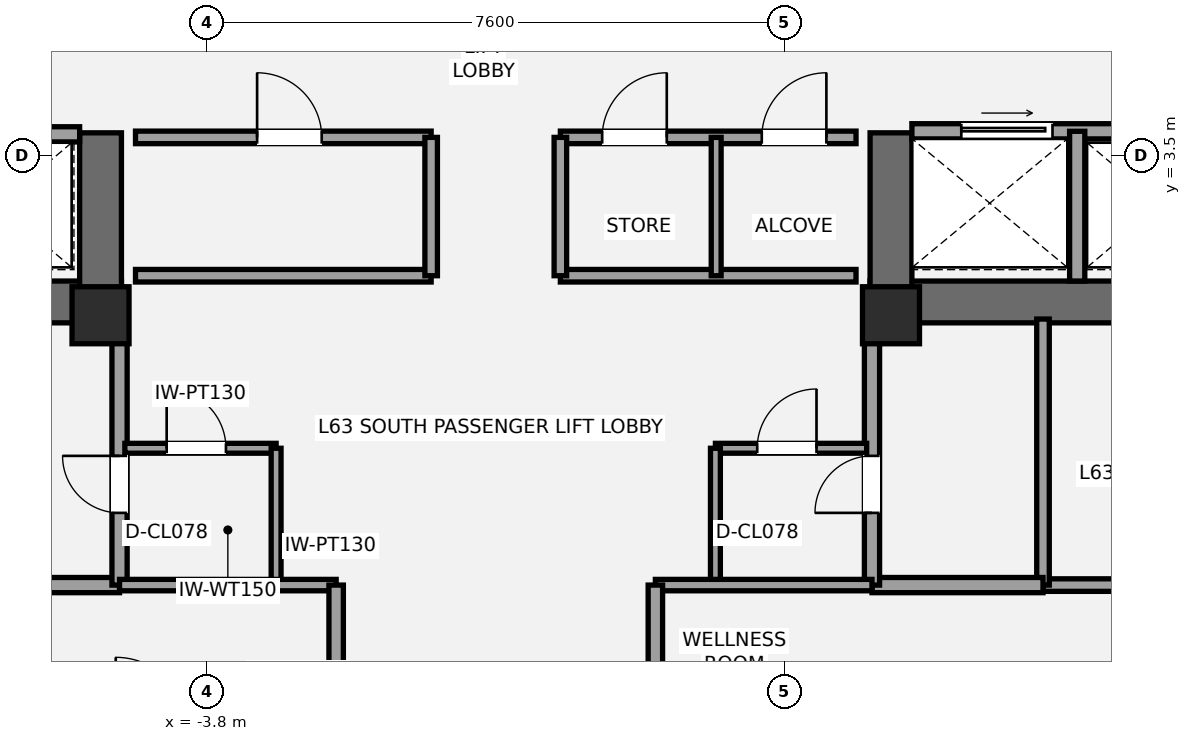
"""IFC4 building model, lengths in metres.
Left out: names, types, materials, properties, quantities, classifications, styles, units other than length and angle.
Written with IfcOpenShell. Run it as: python <this file> out.ifc"""

import sys

from ifc_helpers import new_model, si_unit, direction, frame, frame_2d, origin, origin_2d, place, context, subcontext, project, spatial, rectangle, extrude, element, fill, save


model = new_model("IFC4")
c1 = context("Model", 3, precision=1e-05, world=origin(), true_north=direction((0.0, 1.0)))
c2 = subcontext(c1, "Body", "Model", "MODEL_VIEW")
j1 = project(units=[si_unit("LENGTHUNIT", "METRE"), si_unit("PLANEANGLEUNIT", "RADIAN")], contexts=[c1])
p1 = place(None, origin())
s1 = spatial("IfcSite", under=j1, at=p1, CompositionType="ELEMENT")
p2 = place(p1, origin())
s2 = spatial("IfcBuilding", under=s1, at=p2, CompositionType="ELEMENT")
p3 = place(p2, frame((0.0, 0.0, 225.75)))
s3 = spatial("IfcBuildingStorey", under=s2, at=p3, CompositionType="ELEMENT", Elevation=225.75)
p4 = place(p3, frame((-4.925, 1.575, 0.0), z_axis=(0.0, 0.0, 1.0), x_axis=(-1.0, 0.0, 0.0)))
e1 = element("IfcWall", 1, at=p4, inside=s3, PredefinedType="SHEAR", context=c2, shape_type="SweptSolid", body=[
    extrude(rectangle(XDim=8.775, YDim=0.55, at=frame_2d((4.387, 0.0))), origin(), (0.0, 0.0, 1.0), 3.15),
])
p5 = place(p4, frame((5.375, 0.0, 0.0)))
e2 = element("IfcOpeningElement", 2, at=p5, cuts=e1, PredefinedType="OPENING", context=c2, shape_type="SweptSolid", body=[
    extrude(rectangle(XDim=1.05, YDim=2.15, at=frame_2d((0.525, 1.075))), frame((0.0, 0.285, 0.0), z_axis=(0.0, -1.0, 0.0), x_axis=(1.0, 0.0, 0.0)), (0.0, 0.0, 1.0), 0.57),
])
p6 = place(p4, frame((3.705, 0.0, 0.0)))
e3 = element("IfcOpeningElement", 3, at=p6, cuts=e1, PredefinedType="OPENING", context=c2, shape_type="SweptSolid", body=[
    extrude(rectangle(XDim=1.1, YDim=2.2, at=frame_2d((0.55, 1.1))), frame((0.0, 0.285, 0.0), z_axis=(0.0, -1.0, 0.0), x_axis=(1.0, 0.0, 0.0)), (0.0, 0.0, 1.0), 0.57),
])
p7 = place(p3, frame((-5.2, 1.3, 0.0), z_axis=(0.0, 0.0, 1.0), x_axis=(0.0, 1.0, 0.0)))
e4 = element("IfcWall", 4, at=p7, inside=s3, PredefinedType="SHEAR", context=c2, shape_type="SweptSolid", body=[
    extrude(rectangle(XDim=2.5, YDim=0.55, at=frame_2d((1.25, 0.0))), origin(), (0.0, 0.0, 1.0), 3.15),
])
p8 = place(p3, frame((13.7, 1.575, 0.0), z_axis=(0.0, 0.0, 1.0), x_axis=(-1.0, 0.0, 0.0)))
e5 = element("IfcWall", 5, at=p8, inside=s3, PredefinedType="SHEAR", context=c2, shape_type="SweptSolid", body=[
    extrude(rectangle(XDim=8.775, YDim=0.55, at=frame_2d((4.387, 0.0))), origin(), (0.0, 0.0, 1.0), 3.15),
])
p9 = place(p8, frame((2.35, 0.0, 0.0)))
e6 = element("IfcOpeningElement", 6, at=p9, cuts=e5, PredefinedType="OPENING", context=c2, shape_type="SweptSolid", body=[
    extrude(rectangle(XDim=1.05, YDim=2.15, at=frame_2d((0.525, 1.075))), frame((0.0, 0.285, 0.0), z_axis=(0.0, -1.0, 0.0), x_axis=(1.0, 0.0, 0.0)), (0.0, 0.0, 1.0), 0.57),
])
p10 = place(p8, frame((4.35, 0.0, 0.0)))
e7 = element("IfcOpeningElement", 7, at=p10, cuts=e5, PredefinedType="OPENING", context=c2, shape_type="SweptSolid", body=[
    extrude(rectangle(XDim=1.1, YDim=2.2, at=frame_2d((0.55, 1.1))), frame((0.0, 0.285, 0.0), z_axis=(0.0, -1.0, 0.0), x_axis=(1.0, 0.0, 0.0)), (0.0, 0.0, 1.0), 0.57),
])
p11 = place(p3, frame((5.2, 1.3, 0.0), z_axis=(0.0, 0.0, 1.0), x_axis=(0.0, 1.0, 0.0)))
e8 = element("IfcWall", 8, at=p11, inside=s3, PredefinedType="SHEAR", context=c2, shape_type="SweptSolid", body=[
    extrude(rectangle(XDim=2.5, YDim=0.55, at=frame_2d((1.25, 0.0))), origin(), (0.0, 0.0, 1.0), 3.15),
])
for number, where, z_axis, x_axis in (
    (9, (-5.2, 1.4, 0.0), (0.0, 0.0, 1.0), (1.0, 0.0, 0.0)),
    (10, (5.2, 1.4, 0.0), (0.0, 0.0, 1.0), (1.0, 0.0, 0.0)),
):
    element("IfcColumn", number, at=place(p3, frame(where, z_axis=z_axis, x_axis=x_axis)), inside=s3, PredefinedType="PILASTER", context=c2, shape_type="SweptSolid", body=[
        extrude(rectangle(XDim=0.75, YDim=0.75, at=origin_2d()), origin(), (0.0, 0.0, 1.0), 3.15),
    ])
p12 = place(p3, frame((-7.2, -2.15, 0.0), z_axis=(0.0, 0.0, 1.0), x_axis=(1.0, 0.0, 0.0)))
e11 = element("IfcWall", 11, at=p12, inside=s3, PredefinedType="SOLIDWALL", context=c2, shape_type="SweptSolid", body=[
    extrude(rectangle(XDim=2.25, YDim=0.2, at=frame_2d((1.125, 0.0))), origin(), (0.0, 0.0, 1.0), 2.97),
])
p13 = place(p3, frame((-4.95, -2.15, 0.0), z_axis=(0.0, 0.0, 1.0), x_axis=(0.0, 1.0, 0.0)))
e12 = element("IfcWall", 12, at=p13, inside=s3, PredefinedType="SOLIDWALL", context=c2, shape_type="SweptSolid", body=[
    extrude(rectangle(XDim=3.5, YDim=0.2, at=frame_2d((1.75, 0.0))), origin(), (0.0, 0.0, 1.0), 2.423),
])
p14 = place(p13, frame((0.95, 0.0, 0.0)))
e13 = element("IfcOpeningElement", 13, at=p14, cuts=e12, PredefinedType="OPENING", context=c2, shape_type="SweptSolid", body=[
    extrude(rectangle(XDim=0.75, YDim=2.1, at=frame_2d((0.375, 1.05))), frame((0.0, 0.11, 0.0), z_axis=(0.0, -1.0, 0.0), x_axis=(1.0, 0.0, 0.0)), (0.0, 0.0, 1.0), 0.22),
])
p15 = place(p3, frame((7.2, -2.15, 0.0), z_axis=(0.0, 0.0, 1.0), x_axis=(1.0, 0.0, 0.0)))
e14 = element("IfcWall", 14, at=p15, inside=s3, PredefinedType="PARTITIONING", context=c2, shape_type="SweptSolid", body=[
    extrude(rectangle(XDim=6.25, YDim=0.165, at=frame_2d((3.125, 0.0))), origin(), (0.0, 0.0, 1.0), 2.97),
])
p16 = place(p3, frame((7.2, -2.15, 0.0), z_axis=(0.0, 0.0, 1.0), x_axis=(0.0, 1.0, 0.0)))
e15 = element("IfcWall", 15, at=p16, inside=s3, PredefinedType="PARTITIONING", context=c2, shape_type="SweptSolid", body=[
    extrude(rectangle(XDim=3.5, YDim=0.165, at=frame_2d((1.75, 0.0))), origin(), (0.0, 0.0, 1.0), 2.423),
])
p17 = place(p3, frame((4.95, -2.15, 0.0), z_axis=(0.0, 0.0, 1.0), x_axis=(1.0, 0.0, 0.0)))
e16 = element("IfcWall", 16, at=p17, inside=s3, PredefinedType="SOLIDWALL", context=c2, shape_type="SweptSolid", body=[
    extrude(rectangle(XDim=2.25, YDim=0.2, at=frame_2d((1.125, 0.0))), origin(), (0.0, 0.0, 1.0), 2.97),
])
p18 = place(p3, frame((4.95, -2.15, 0.0), z_axis=(0.0, 0.0, 1.0), x_axis=(0.0, 1.0, 0.0)))
e17 = element("IfcWall", 17, at=p18, inside=s3, PredefinedType="SOLIDWALL", context=c2, shape_type="SweptSolid", body=[
    extrude(rectangle(XDim=3.5, YDim=0.2, at=frame_2d((1.75, 0.0))), origin(), (0.0, 0.0, 1.0), 2.423),
])
p19 = place(p18, frame((0.95, 0.0, 0.0)))
e18 = element("IfcOpeningElement", 18, at=p19, cuts=e17, PredefinedType="OPENING", context=c2, shape_type="SweptSolid", body=[
    extrude(rectangle(XDim=0.75, YDim=2.1, at=frame_2d((0.375, 1.05))), frame((0.0, 0.11, 0.0), z_axis=(0.0, -1.0, 0.0), x_axis=(1.0, 0.0, 0.0)), (0.0, 0.0, 1.0), 0.22),
])
p20 = place(p3, frame((-4.88, -0.35, 0.0), z_axis=(0.0, 0.0, 1.0), x_axis=(1.0, 0.0, 0.0)))
e19 = element("IfcWall", 19, at=p20, inside=s3, PredefinedType="PARTITIONING", context=c2, shape_type="SweptSolid", body=[
    extrude(rectangle(XDim=1.99, YDim=0.13, at=frame_2d((0.995, 0.0))), origin(), (0.0, 0.0, 1.0), 2.97),
])
p21 = place(p20, frame((0.55, 0.0, 0.0)))
e20 = element("IfcOpeningElement", 20, at=p21, cuts=e19, PredefinedType="OPENING", context=c2, shape_type="SweptSolid", body=[
    extrude(rectangle(XDim=0.78, YDim=2.1, at=frame_2d((0.39, 1.05))), frame((0.0, 0.075, 0.0), z_axis=(0.0, -1.0, 0.0), x_axis=(1.0, 0.0, 0.0)), (0.0, 0.0, 1.0), 0.15),
])
p22 = place(p3, frame((-2.89, -2.15, 0.0), z_axis=(0.0, 0.0, 1.0), x_axis=(0.0, 1.0, 0.0)))
e21 = element("IfcWall", 21, at=p22, inside=s3, PredefinedType="PARTITIONING", context=c2, shape_type="SweptSolid", body=[
    extrude(rectangle(XDim=1.8, YDim=0.13, at=frame_2d((0.9, 0.0))), origin(), (0.0, 0.0, 1.0), 2.423),
])
p23 = place(p3, frame((2.89, -0.35, 0.0), z_axis=(0.0, 0.0, 1.0), x_axis=(1.0, 0.0, 0.0)))
e22 = element("IfcWall", 22, at=p23, inside=s3, PredefinedType="PARTITIONING", context=c2, shape_type="SweptSolid", body=[
    extrude(rectangle(XDim=1.99, YDim=0.13, at=frame_2d((0.995, 0.0))), origin(), (0.0, 0.0, 1.0), 2.423),
])
p24 = place(p23, frame((0.55, 0.0, 0.0)))
e23 = element("IfcOpeningElement", 23, at=p24, cuts=e22, PredefinedType="OPENING", context=c2, shape_type="SweptSolid", body=[
    extrude(rectangle(XDim=0.78, YDim=2.1, at=frame_2d((0.39, 1.05))), frame((0.0, 0.075, 0.0), z_axis=(0.0, -1.0, 0.0), x_axis=(1.0, 0.0, 0.0)), (0.0, 0.0, 1.0), 0.15),
])
p25 = place(p3, frame((2.89, -2.15, 0.0), z_axis=(0.0, 0.0, 1.0), x_axis=(0.0, 1.0, 0.0)))
e24 = element("IfcWall", 24, at=p25, inside=s3, PredefinedType="PARTITIONING", context=c2, shape_type="SweptSolid", body=[
    extrude(rectangle(XDim=1.8, YDim=0.13, at=frame_2d((0.9, 0.0))), origin(), (0.0, 0.0, 1.0), 2.97),
])
p26 = place(p3, frame((-9.78, 3.78, 0.0), z_axis=(0.0, 0.0, 1.0), x_axis=(1.0, 0.0, 0.0)))
e25 = element("IfcWall", 25, at=p26, inside=s3, PredefinedType="SOLIDWALL", context=c2, shape_type="SweptSolid", body=[
    extrude(rectangle(XDim=4.305, YDim=0.2, at=frame_2d((2.152, 0.0))), origin(), (0.0, 0.0, 1.0), 2.97),
])
p27 = place(p26, frame((2.72, 0.0, 0.0)))
e26 = element("IfcOpeningElement", 26, at=p27, cuts=e25, PredefinedType="OPENING", context=c2, shape_type="SweptSolid", body=[
    extrude(rectangle(XDim=1.1, YDim=2.2, at=frame_2d((0.55, 1.1))), frame((0.0, 0.11, 0.0), z_axis=(0.0, -1.0, 0.0), x_axis=(1.0, 0.0, 0.0)), (0.0, 0.0, 1.0), 0.22),
])
p28 = place(p3, frame((5.475, 3.82, 0.0), z_axis=(0.0, 0.0, 1.0), x_axis=(1.0, 0.0, 0.0)))
e27 = element("IfcWall", 27, at=p28, inside=s3, PredefinedType="SOLIDWALL", context=c2, shape_type="SweptSolid", body=[
    extrude(rectangle(XDim=4.305, YDim=0.2, at=frame_2d((2.152, 0.0))), origin(), (0.0, 0.0, 1.0), 2.97),
])
p29 = place(p28, frame((0.65, 0.0, 0.0)))
e28 = element("IfcOpeningElement", 28, at=p29, cuts=e27, PredefinedType="OPENING", context=c2, shape_type="SweptSolid", body=[
    extrude(rectangle(XDim=1.2, YDim=2.2, at=frame_2d((0.6, 1.1))), frame((0.0, 0.11, 0.0), z_axis=(0.0, -1.0, 0.0), x_axis=(1.0, 0.0, 0.0)), (0.0, 0.0, 1.0), 0.22),
])
p30 = place(p3, frame((7.65, 1.85, 0.0), z_axis=(0.0, 0.0, 1.0), x_axis=(0.0, 1.0, 0.0)))
e29 = element("IfcWall", 29, at=p30, inside=s3, PredefinedType="SOLIDWALL", context=c2, shape_type="SweptSolid", body=[
    extrude(rectangle(XDim=1.97, YDim=0.2, at=frame_2d((0.985, 0.0))), origin(), (0.0, 0.0, 1.0), 2.97),
])
p31 = place(p3, frame((-4.74, 1.92, 0.0), z_axis=(0.0, 0.0, 1.0), x_axis=(1.0, 0.0, 0.0)))
e30 = element("IfcWall", 30, at=p31, inside=s3, PredefinedType="PARTITIONING", context=c2, shape_type="SweptSolid", body=[
    extrude(rectangle(XDim=3.89, YDim=0.165, at=frame_2d((1.945, 0.0))), origin(), (0.0, 0.0, 1.0), 2.11),
])
p32 = place(p3, frame((-4.74, 3.74, 0.0), z_axis=(0.0, 0.0, 1.0), x_axis=(1.0, 0.0, 0.0)))
e31 = element("IfcWall", 31, at=p32, inside=s3, PredefinedType="PARTITIONING", context=c2, shape_type="SweptSolid", body=[
    extrude(rectangle(XDim=3.89, YDim=0.165, at=frame_2d((1.945, 0.0))), origin(), (0.0, 0.0, 1.0), 2.97),
])
p33 = place(p32, frame((1.6, 0.0, 0.0)))
e32 = element("IfcOpeningElement", 32, at=p33, cuts=e31, PredefinedType="OPENING", context=c2, shape_type="SweptSolid", body=[
    extrude(rectangle(XDim=0.85, YDim=2.1, at=frame_2d((0.425, 1.05))), frame((0.0, 0.093, 0.0), z_axis=(0.0, -1.0, 0.0), x_axis=(1.0, 0.0, 0.0)), (0.0, 0.0, 1.0), 0.185),
])
p34 = place(p3, frame((-0.85, 1.92, 0.0), z_axis=(0.0, 0.0, 1.0), x_axis=(0.0, 1.0, 0.0)))
e33 = element("IfcWall", 33, at=p34, inside=s3, PredefinedType="PARTITIONING", context=c2, shape_type="SweptSolid", body=[
    extrude(rectangle(XDim=1.82, YDim=0.165, at=frame_2d((0.91, 0.0))), origin(), (0.0, 0.0, 1.0), 2.97),
])
p35 = place(p3, frame((0.85, 1.92, 0.0), z_axis=(0.0, 0.0, 1.0), x_axis=(1.0, 0.0, 0.0)))
e34 = element("IfcWall", 34, at=p35, inside=s3, PredefinedType="PARTITIONING", context=c2, shape_type="SweptSolid", body=[
    extrude(rectangle(XDim=3.89, YDim=0.165, at=frame_2d((1.945, 0.0))), origin(), (0.0, 0.0, 1.0), 2.11),
])
p36 = place(p3, frame((0.85, 3.74, 0.0), z_axis=(0.0, 0.0, 1.0), x_axis=(1.0, 0.0, 0.0)))
e35 = element("IfcWall", 35, at=p36, inside=s3, PredefinedType="PARTITIONING", context=c2, shape_type="SweptSolid", body=[
    extrude(rectangle(XDim=3.89, YDim=0.165, at=frame_2d((1.945, 0.0))), origin(), (0.0, 0.0, 1.0), 2.97),
])
p37 = place(p36, frame((0.55, 0.0, 0.0)))
e36 = element("IfcOpeningElement", 36, at=p37, cuts=e35, PredefinedType="OPENING", context=c2, shape_type="SweptSolid", body=[
    extrude(rectangle(XDim=0.85, YDim=2.1, at=frame_2d((0.425, 1.05))), frame((0.0, 0.093, 0.0), z_axis=(0.0, -1.0, 0.0), x_axis=(1.0, 0.0, 0.0)), (0.0, 0.0, 1.0), 0.185),
])
p38 = place(p36, frame((2.65, 0.0, 0.0)))
e37 = element("IfcOpeningElement", 37, at=p38, cuts=e35, PredefinedType="OPENING", context=c2, shape_type="SweptSolid", body=[
    extrude(rectangle(XDim=0.85, YDim=2.1, at=frame_2d((0.425, 1.05))), frame((0.0, 0.093, 0.0), z_axis=(0.0, -1.0, 0.0), x_axis=(1.0, 0.0, 0.0)), (0.0, 0.0, 1.0), 0.185),
])
p39 = place(p3, frame((0.85, 1.92, 0.0), z_axis=(0.0, 0.0, 1.0), x_axis=(0.0, 1.0, 0.0)))
e38 = element("IfcWall", 38, at=p39, inside=s3, PredefinedType="PARTITIONING", context=c2, shape_type="SweptSolid", body=[
    extrude(rectangle(XDim=1.82, YDim=0.165, at=frame_2d((0.91, 0.0))), origin(), (0.0, 0.0, 1.0), 2.97),
])
p40 = place(p3, frame((2.9, 1.92, 0.0), z_axis=(0.0, 0.0, 1.0), x_axis=(0.0, 1.0, 0.0)))
e39 = element("IfcWall", 39, at=p40, inside=s3, PredefinedType="PARTITIONING", context=c2, shape_type="SweptSolid", body=[
    extrude(rectangle(XDim=1.82, YDim=0.13, at=frame_2d((0.91, 0.0))), origin(), (0.0, 0.0, 1.0), 2.97),
])
p41 = place(p3, frame((-4.95, -2.15, 0.0), z_axis=(0.0, 0.0, 1.0), x_axis=(1.0, 0.0, 0.0)))
e40 = element("IfcWall", 40, at=p41, inside=s3, PredefinedType="PLUMBINGWALL", context=c2, shape_type="SweptSolid", body=[
    extrude(rectangle(XDim=2.85, YDim=0.15, at=frame_2d((1.425, 0.0))), origin(), (0.0, 0.0, 1.0), 2.97),
])
p42 = place(p3, frame((-2.1, -4.05, 0.0), z_axis=(0.0, 0.0, 1.0), x_axis=(0.0, 1.0, 0.0)))
e41 = element("IfcWall", 41, at=p42, inside=s3, PredefinedType="PLUMBINGWALL", context=c2, shape_type="SweptSolid", body=[
    extrude(rectangle(XDim=1.9, YDim=0.19, at=frame_2d((0.95, 0.0))), origin(), (0.0, 0.0, 1.0), 2.423),
])
p43 = place(p3, frame((2.1, -2.15, 0.0), z_axis=(0.0, 0.0, 1.0), x_axis=(1.0, 0.0, 0.0)))
e42 = element("IfcWall", 42, at=p43, inside=s3, PredefinedType="PLUMBINGWALL", context=c2, shape_type="SweptSolid", body=[
    extrude(rectangle(XDim=2.85, YDim=0.15, at=frame_2d((1.425, 0.0))), origin(), (0.0, 0.0, 1.0), 2.97),
])
p44 = place(p3, frame((2.1, -4.05, 0.0), z_axis=(0.0, 0.0, 1.0), x_axis=(0.0, 1.0, 0.0)))
e43 = element("IfcWall", 43, at=p44, inside=s3, PredefinedType="PLUMBINGWALL", context=c2, shape_type="SweptSolid", body=[
    extrude(rectangle(XDim=1.9, YDim=0.19, at=frame_2d((0.95, 0.0))), origin(), (0.0, 0.0, 1.0), 2.97),
])
p45 = place(p14, origin())
e44 = element("IfcDoor", 44, at=p45, inside=s3, OperationType="SINGLE_SWING_RIGHT", PredefinedType="DOOR", context=c2, shape_type="SweptSolid", body=[
    extrude(rectangle(XDim=0.75, YDim=2.1, at=frame_2d((0.375, 1.05))), frame((0.0, 0.025, 0.0), z_axis=(0.0, -1.0, 0.0), x_axis=(1.0, 0.0, 0.0)), (0.0, 0.0, 1.0), 0.05),
])
fill(e13, e44)
p46 = place(p19, origin())
e45 = element("IfcDoor", 45, at=p46, inside=s3, OperationType="SINGLE_SWING_LEFT", PredefinedType="DOOR", context=c2, shape_type="SweptSolid", body=[
    extrude(rectangle(XDim=0.75, YDim=2.1, at=frame_2d((0.375, 1.05))), frame((0.0, 0.025, 0.0), z_axis=(0.0, -1.0, 0.0), x_axis=(1.0, 0.0, 0.0)), (0.0, 0.0, 1.0), 0.05),
])
fill(e18, e45)
p47 = place(p21, origin())
e46 = element("IfcDoor", 46, at=p47, inside=s3, OperationType="SINGLE_SWING_LEFT", PredefinedType="DOOR", context=c2, shape_type="SweptSolid", body=[
    extrude(rectangle(XDim=0.78, YDim=2.1, at=frame_2d((0.39, 1.05))), frame((0.0, 0.025, 0.0), z_axis=(0.0, -1.0, 0.0), x_axis=(1.0, 0.0, 0.0)), (0.0, 0.0, 1.0), 0.05),
])
fill(e20, e46)
p48 = place(p24, origin())
e47 = element("IfcDoor", 47, at=p48, inside=s3, OperationType="SINGLE_SWING_RIGHT", PredefinedType="DOOR", context=c2, shape_type="SweptSolid", body=[
    extrude(rectangle(XDim=0.78, YDim=2.1, at=frame_2d((0.39, 1.05))), frame((0.0, 0.025, 0.0), z_axis=(0.0, -1.0, 0.0), x_axis=(1.0, 0.0, 0.0)), (0.0, 0.0, 1.0), 0.05),
])
fill(e23, e47)
p49 = place(p29, origin())
e48 = element("IfcDoor", 48, at=p49, inside=s3, OperationType="SLIDING_TO_RIGHT", PredefinedType="DOOR", context=c2, shape_type="SweptSolid", body=[
    extrude(rectangle(XDim=1.2, YDim=2.2, at=frame_2d((0.6, 1.1))), frame((0.0, 0.025, 0.0), z_axis=(0.0, -1.0, 0.0), x_axis=(1.0, 0.0, 0.0)), (0.0, 0.0, 1.0), 0.05),
])
fill(e28, e48)
p50 = place(p33, origin())
e49 = element("IfcDoor", 49, at=p50, inside=s3, OperationType="SINGLE_SWING_LEFT", PredefinedType="DOOR", context=c2, shape_type="SweptSolid", body=[
    extrude(rectangle(XDim=0.85, YDim=2.1, at=frame_2d((0.425, 1.05))), frame((0.0, 0.025, 0.0), z_axis=(0.0, -1.0, 0.0), x_axis=(1.0, 0.0, 0.0)), (0.0, 0.0, 1.0), 0.05),
])
fill(e32, e49)
p51 = place(p37, origin())
e50 = element("IfcDoor", 50, at=p51, inside=s3, OperationType="SINGLE_SWING_RIGHT", PredefinedType="DOOR", context=c2, shape_type="SweptSolid", body=[
    extrude(rectangle(XDim=0.85, YDim=2.1, at=frame_2d((0.425, 1.05))), frame((0.0, 0.025, 0.0), z_axis=(0.0, -1.0, 0.0), x_axis=(1.0, 0.0, 0.0)), (0.0, 0.0, 1.0), 0.05),
])
fill(e36, e50)
p52 = place(p38, origin())
e51 = element("IfcDoor", 51, at=p52, inside=s3, OperationType="SINGLE_SWING_RIGHT", PredefinedType="DOOR", context=c2, shape_type="SweptSolid", body=[
    extrude(rectangle(XDim=0.85, YDim=2.1, at=frame_2d((0.425, 1.05))), frame((0.0, 0.025, 0.0), z_axis=(0.0, -1.0, 0.0), x_axis=(1.0, 0.0, 0.0)), (0.0, 0.0, 1.0), 0.05),
])
fill(e37, e51)
save(model, sys.argv[1])
